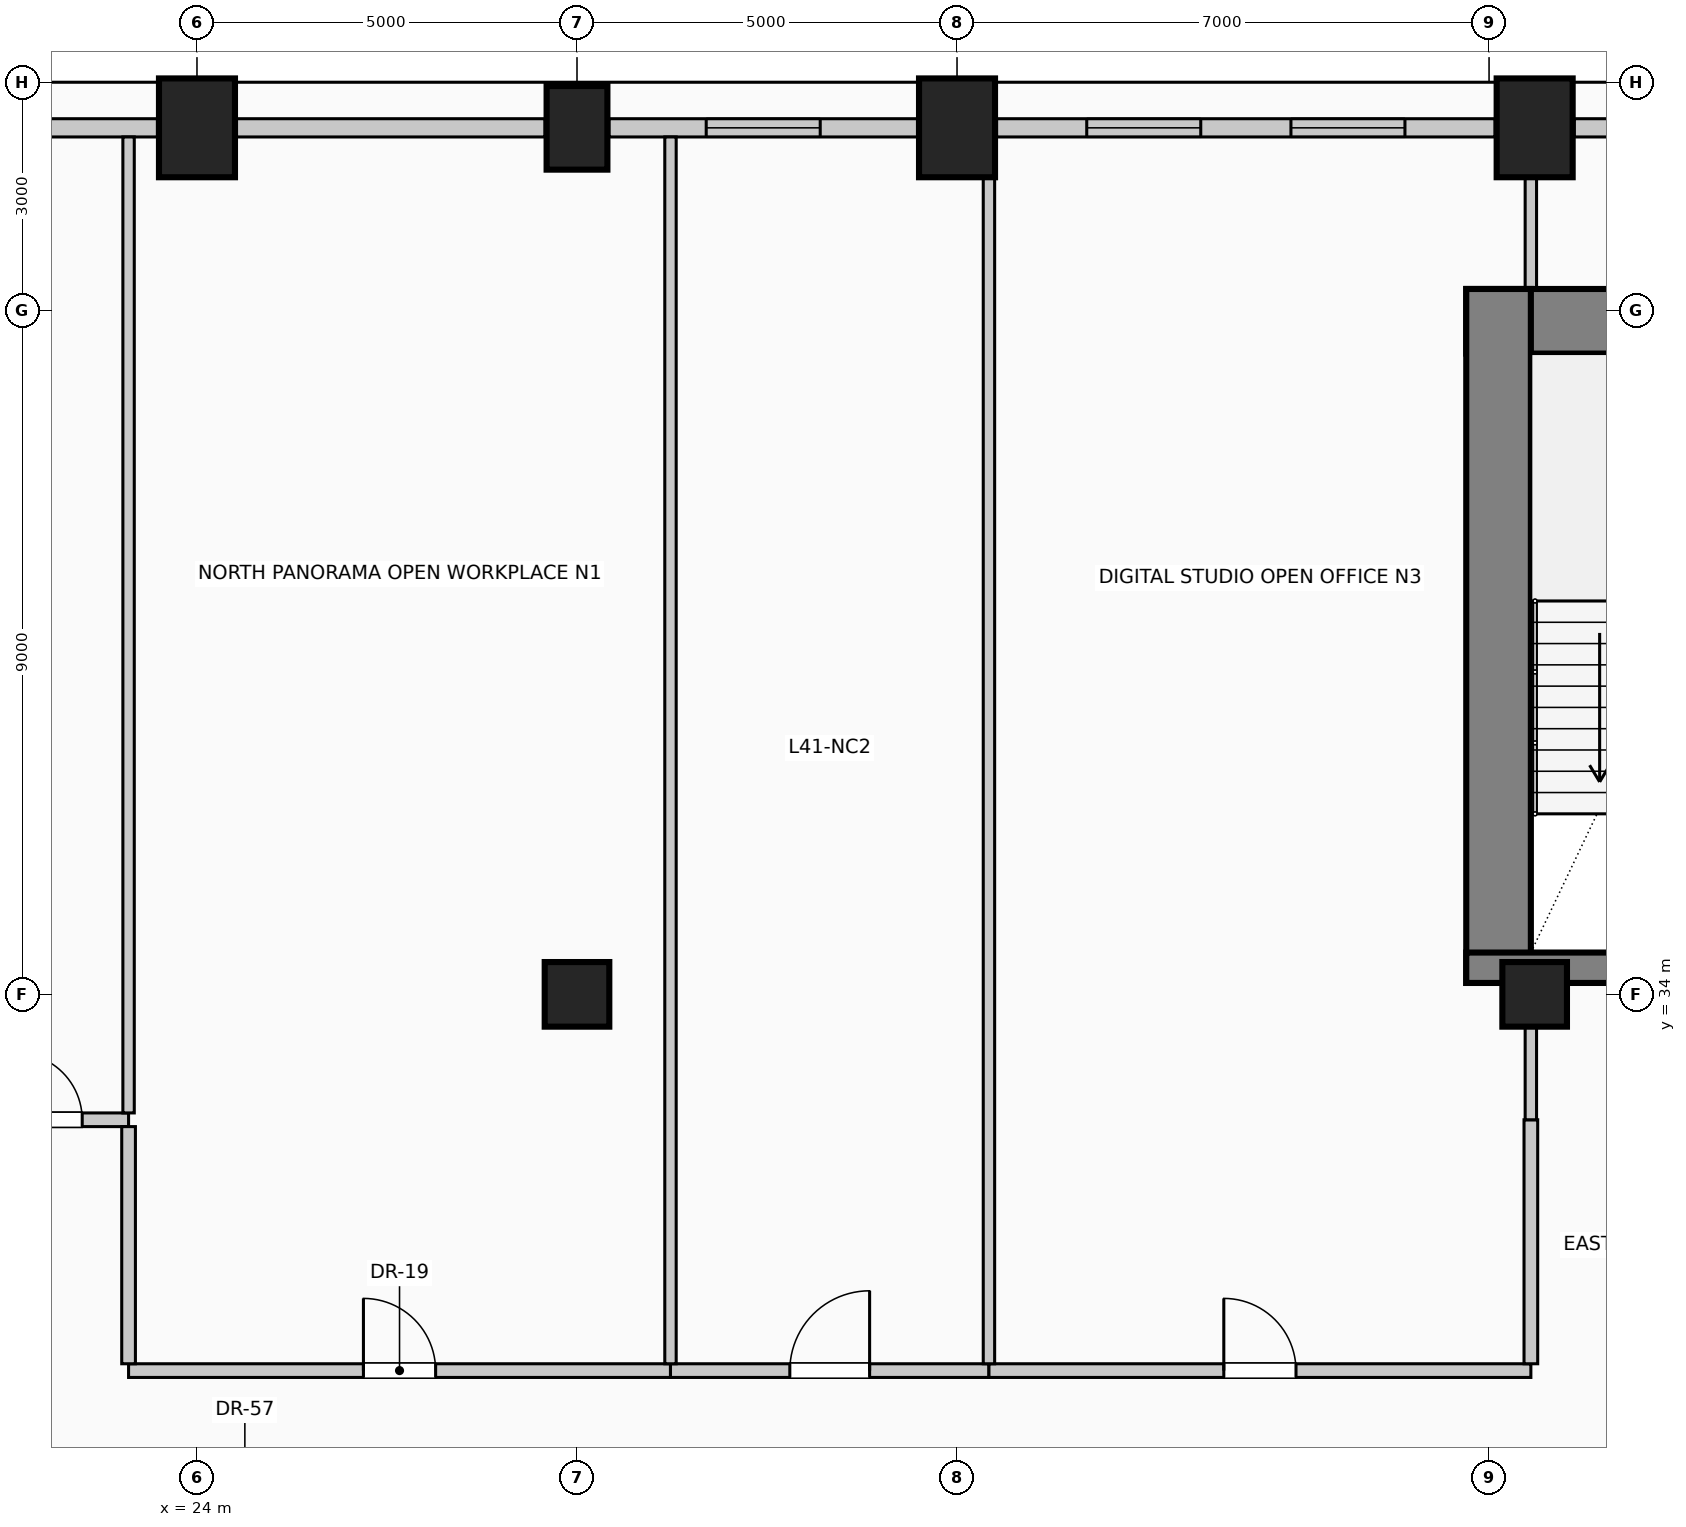
"""IFC4 building model, lengths in metres.
Left out: names, types, materials, properties, quantities, classifications, styles, units other than length and angle.
Written with IfcOpenShell. Run it as: python <this file> out.ifc"""

import sys

from ifc_helpers import new_model, si_unit, direction, frame, frame_2d, origin, origin_2d, place, context, subcontext, project, spatial, rectangle, circle, extrude, element, fill, save


model = new_model("IFC4")
c1 = context("Model", 3, precision=1e-05, world=origin(), true_north=direction((0.0, 1.0)))
c2 = subcontext(c1, "Body", "Model", "MODEL_VIEW")
j1 = project(units=[si_unit("LENGTHUNIT", "METRE"), si_unit("PLANEANGLEUNIT", "RADIAN")], contexts=[c1])
p1 = place(None, origin())
s1 = spatial("IfcSite", under=j1, at=p1, CompositionType="ELEMENT")
p2 = place(p1, origin())
s2 = spatial("IfcBuilding", under=s1, at=p2, CompositionType="ELEMENT")
p3 = place(p2, frame((0.0, 0.0, 170.6)))
s3 = spatial("IfcBuildingStorey", under=s2, at=p3, CompositionType="ELEMENT", Elevation=170.6)
p4 = place(p3, frame((40.7, 42.855, 0.0), z_axis=(0.0, 0.0, 1.0), x_axis=(1.0, 0.0, 0.0)))
e1 = element("IfcWall", 1, at=p4, inside=s3, PredefinedType="SHEAR", context=c2, shape_type="SweptSolid", body=[
    extrude(rectangle(XDim=14.6, YDim=0.85, at=frame_2d((7.3, 0.0))), origin(), (0.0, 0.0, 1.0), 4.0),
])
p5 = place(p3, frame((41.125, 34.15, 0.0), z_axis=(0.0, 0.0, 1.0), x_axis=(0.0, 1.0, 0.0)))
e2 = element("IfcWall", 2, at=p5, inside=s3, PredefinedType="SHEAR", context=c2, shape_type="SweptSolid", body=[
    extrude(rectangle(XDim=9.13, YDim=0.85, at=frame_2d((4.565, 0.0))), origin(), (0.0, 0.0, 1.0), 4.0),
])
p6 = place(p3, frame((40.7, 34.35, 0.0), z_axis=(0.0, 0.0, 1.0), x_axis=(1.0, 0.0, 0.0)))
e3 = element("IfcWall", 3, at=p6, inside=s3, PredefinedType="SHEAR", context=c2, shape_type="SweptSolid", body=[
    extrude(rectangle(XDim=5.01, YDim=0.4, at=frame_2d((2.505, 0.0))), origin(), (0.0, 0.0, 1.0), 4.0),
])
p7 = place(p6, frame((2.4, 0.0, 0.0)))
e4 = element("IfcOpeningElement", 4, at=p7, cuts=e3, PredefinedType="OPENING", context=c2, shape_type="SweptSolid", body=[
    extrude(rectangle(XDim=1.15, YDim=2.2, at=frame_2d((0.575, 1.1))), frame((0.0, 0.21, 0.0), z_axis=(0.0, -1.0, 0.0), x_axis=(1.0, 0.0, 0.0)), (0.0, 0.0, 1.0), 0.42),
])
p8 = place(p3, frame((24.0, 45.4, 0.0), z_axis=(0.0, 0.0, 1.0), x_axis=(1.0, 0.0, 0.0)))
e5 = element("IfcColumn", 5, at=p8, inside=s3, PredefinedType="COLUMN", context=c2, shape_type="SweptSolid", body=[
    extrude(rectangle(XDim=1.0, YDim=1.3, at=origin_2d()), origin(), (0.0, 0.0, 1.0), 4.0),
])
p9 = place(p3, frame((29.0, 45.4, 0.0), z_axis=(0.0, 0.0, 1.0), x_axis=(1.0, 0.0, 0.0)))
e6 = element("IfcColumn", 6, at=p9, inside=s3, PredefinedType="COLUMN", context=c2, shape_type="SweptSolid", body=[
    extrude(rectangle(XDim=0.8, YDim=1.1, at=origin_2d()), origin(), (0.0, 0.0, 1.0), 4.0),
])
for number, where, z_axis, x_axis in (
    (7, (34.0, 45.4, 0.0), (0.0, 0.0, 1.0), (1.0, 0.0, 0.0)),
    (8, (41.6, 45.4, 0.0), (0.0, 0.0, 1.0), (1.0, 0.0, 0.0)),
):
    element("IfcColumn", number, at=place(p3, frame(where, z_axis=z_axis, x_axis=x_axis)), inside=s3, PredefinedType="COLUMN", context=c2, shape_type="SweptSolid", body=[
        extrude(rectangle(XDim=1.0, YDim=1.3, at=origin_2d()), origin(), (0.0, 0.0, 1.0), 4.0),
    ])
for number, where, z_axis, x_axis in (
    (9, (29.0, 34.0, 0.0), (0.0, 0.0, 1.0), (1.0, 0.0, 0.0)),
    (10, (41.6, 34.0, 0.0), (0.0, 0.0, 1.0), (1.0, 0.0, 0.0)),
):
    element("IfcColumn", number, at=place(p3, frame(where, z_axis=z_axis, x_axis=x_axis)), inside=s3, PredefinedType="COLUMN", context=c2, shape_type="SweptSolid", body=[
        extrude(circle(Radius=0.425, at=origin_2d()), origin(), (0.0, 0.0, 1.0), 4.0),
    ])
p10 = place(p3, frame((16.92, 45.4, 0.0), z_axis=(0.0, 0.0, 1.0), x_axis=(1.0, 0.0, 0.0)))
e11 = element("IfcWall", 11, at=p10, inside=s3, PredefinedType="SOLIDWALL", context=c2, shape_type="SweptSolid", body=[
    extrude(rectangle(XDim=6.56, YDim=0.24, at=frame_2d((3.28, 0.0))), origin(), (0.0, 0.0, 1.0), 2.975),
])
p11 = place(p10, frame((1.187, 0.0, 0.42)))
e12 = element("IfcOpeningElement", 12, at=p11, cuts=e11, PredefinedType="OPENING", context=c2, shape_type="SweptSolid", body=[
    extrude(rectangle(XDim=1.5, YDim=2.2, at=frame_2d((0.75, 1.1))), frame((0.0, 0.13, 0.0), z_axis=(0.0, -1.0, 0.0), x_axis=(1.0, 0.0, 0.0)), (0.0, 0.0, 1.0), 0.26),
])
p12 = place(p3, frame((24.52, 45.4, 0.0), z_axis=(0.0, 0.0, 1.0), x_axis=(1.0, 0.0, 0.0)))
e13 = element("IfcWall", 13, at=p12, inside=s3, PredefinedType="SOLIDWALL", context=c2, shape_type="SweptSolid", body=[
    extrude(rectangle(XDim=4.06, YDim=0.24, at=frame_2d((2.03, 0.0))), origin(), (0.0, 0.0, 1.0), 2.975),
])
p13 = place(p3, frame((29.42, 45.4, 0.0), z_axis=(0.0, 0.0, 1.0), x_axis=(1.0, 0.0, 0.0)))
e14 = element("IfcWall", 14, at=p13, inside=s3, PredefinedType="SOLIDWALL", context=c2, shape_type="SweptSolid", body=[
    extrude(rectangle(XDim=4.06, YDim=0.24, at=frame_2d((2.03, 0.0))), origin(), (0.0, 0.0, 1.0), 2.975),
])
p14 = place(p13, frame((1.28, 0.0, 0.42)))
e15 = element("IfcOpeningElement", 15, at=p14, cuts=e14, PredefinedType="OPENING", context=c2, shape_type="SweptSolid", body=[
    extrude(rectangle(XDim=1.5, YDim=2.2, at=frame_2d((0.75, 1.1))), frame((0.0, 0.13, 0.0), z_axis=(0.0, -1.0, 0.0), x_axis=(1.0, 0.0, 0.0)), (0.0, 0.0, 1.0), 0.26),
])
p15 = place(p3, frame((34.52, 45.4, 0.0), z_axis=(0.0, 0.0, 1.0), x_axis=(1.0, 0.0, 0.0)))
e16 = element("IfcWall", 16, at=p15, inside=s3, PredefinedType="SOLIDWALL", context=c2, shape_type="SweptSolid", body=[
    extrude(rectangle(XDim=6.56, YDim=0.24, at=frame_2d((3.28, 0.0))), origin(), (0.0, 0.0, 1.0), 2.975),
])
p16 = place(p15, frame((1.187, 0.0, 0.42)))
e17 = element("IfcOpeningElement", 17, at=p16, cuts=e16, PredefinedType="OPENING", context=c2, shape_type="SweptSolid", body=[
    extrude(rectangle(XDim=1.5, YDim=2.2, at=frame_2d((0.75, 1.1))), frame((0.0, 0.13, 0.0), z_axis=(0.0, -1.0, 0.0), x_axis=(1.0, 0.0, 0.0)), (0.0, 0.0, 1.0), 0.26),
])
p17 = place(p15, frame((3.873, 0.0, 0.42)))
e18 = element("IfcOpeningElement", 18, at=p17, cuts=e16, PredefinedType="OPENING", context=c2, shape_type="SweptSolid", body=[
    extrude(rectangle(XDim=1.5, YDim=2.2, at=frame_2d((0.75, 1.1))), frame((0.0, 0.13, 0.0), z_axis=(0.0, -1.0, 0.0), x_axis=(1.0, 0.0, 0.0)), (0.0, 0.0, 1.0), 0.26),
])
p18 = place(p3, frame((42.12, 45.4, 0.0), z_axis=(0.0, 0.0, 1.0), x_axis=(1.0, 0.0, 0.0)))
e19 = element("IfcWall", 19, at=p18, inside=s3, PredefinedType="SOLIDWALL", context=c2, shape_type="SweptSolid", body=[
    extrude(rectangle(XDim=1.46, YDim=0.24, at=frame_2d((0.73, 0.0))), origin(), (0.0, 0.0, 1.0), 2.975),
])
p19 = place(p3, frame((23.1, 29.05, 0.0), z_axis=(0.0, 0.0, 1.0), x_axis=(1.0, 0.0, 0.0)))
e20 = element("IfcWall", 20, at=p19, inside=s3, PredefinedType="PARTITIONING", context=c2, shape_type="SweptSolid", body=[
    extrude(rectangle(XDim=7.13, YDim=0.18, at=frame_2d((3.565, 0.0))), origin(), (0.0, 0.0, 1.0), 3.725),
])
p20 = place(p19, frame((3.09, 0.0, 0.0)))
e21 = element("IfcOpeningElement", 21, at=p20, cuts=e20, PredefinedType="OPENING", context=c2, shape_type="SweptSolid", body=[
    extrude(rectangle(XDim=0.95, YDim=2.15, at=frame_2d((0.475, 1.075))), frame((0.0, 0.1, 0.0), z_axis=(0.0, -1.0, 0.0), x_axis=(1.0, 0.0, 0.0)), (0.0, 0.0, 1.0), 0.2),
])
p21 = place(p3, frame((30.23, 29.05, 0.0), z_axis=(0.0, 0.0, 1.0), x_axis=(1.0, 0.0, 0.0)))
e22 = element("IfcWall", 22, at=p21, inside=s3, PredefinedType="PARTITIONING", context=c2, shape_type="SweptSolid", body=[
    extrude(rectangle(XDim=4.19, YDim=0.18, at=frame_2d((2.095, 0.0))), origin(), (0.0, 0.0, 1.0), 3.725),
])
p22 = place(p21, frame((1.57, 0.0, 0.0)))
e23 = element("IfcOpeningElement", 23, at=p22, cuts=e22, PredefinedType="OPENING", context=c2, shape_type="SweptSolid", body=[
    extrude(rectangle(XDim=1.05, YDim=2.15, at=frame_2d((0.525, 1.075))), frame((0.0, 0.1, 0.0), z_axis=(0.0, -1.0, 0.0), x_axis=(1.0, 0.0, 0.0)), (0.0, 0.0, 1.0), 0.2),
])
p23 = place(p3, frame((34.42, 29.05, 0.0), z_axis=(0.0, 0.0, 1.0), x_axis=(1.0, 0.0, 0.0)))
e24 = element("IfcWall", 24, at=p23, inside=s3, PredefinedType="PARTITIONING", context=c2, shape_type="SweptSolid", body=[
    extrude(rectangle(XDim=7.13, YDim=0.18, at=frame_2d((3.565, 0.0))), origin(), (0.0, 0.0, 1.0), 3.725),
])
p24 = place(p23, frame((3.09, 0.0, 0.0)))
e25 = element("IfcOpeningElement", 25, at=p24, cuts=e24, PredefinedType="OPENING", context=c2, shape_type="SweptSolid", body=[
    extrude(rectangle(XDim=0.95, YDim=2.15, at=frame_2d((0.475, 1.075))), frame((0.0, 0.1, 0.0), z_axis=(0.0, -1.0, 0.0), x_axis=(1.0, 0.0, 0.0)), (0.0, 0.0, 1.0), 0.2),
])
p25 = place(p3, frame((21.0, 32.35, 0.0), z_axis=(0.0, 0.0, 1.0), x_axis=(1.0, 0.0, 0.0)))
e26 = element("IfcWall", 26, at=p25, inside=s3, PredefinedType="PARTITIONING", context=c2, shape_type="SweptSolid", body=[
    extrude(rectangle(XDim=2.1, YDim=0.18, at=frame_2d((1.05, 0.0))), origin(), (0.0, 0.0, 1.0), 3.725),
])
p26 = place(p25, frame((0.61, 0.0, 0.0)))
e27 = element("IfcOpeningElement", 27, at=p26, cuts=e26, PredefinedType="OPENING", context=c2, shape_type="SweptSolid", body=[
    extrude(rectangle(XDim=0.88, YDim=2.1, at=frame_2d((0.44, 1.05))), frame((0.0, 0.1, 0.0), z_axis=(0.0, -1.0, 0.0), x_axis=(1.0, 0.0, 0.0)), (0.0, 0.0, 1.0), 0.2),
])
p27 = place(p3, frame((23.1, 29.14, 0.0), z_axis=(0.0, 0.0, 1.0), x_axis=(0.0, 1.0, 0.0)))
e28 = element("IfcWall", 28, at=p27, inside=s3, PredefinedType="PARTITIONING", context=c2, shape_type="SweptSolid", body=[
    extrude(rectangle(XDim=3.12, YDim=0.18, at=frame_2d((1.56, 0.0))), origin(), (0.0, 0.0, 1.0), 3.725),
])
p28 = place(p3, frame((23.1, 32.44, 0.0), z_axis=(0.0, 0.0, 1.0), x_axis=(0.0, 1.0, 0.0)))
e29 = element("IfcWall", 29, at=p28, inside=s3, PredefinedType="PARTITIONING", context=c2, shape_type="SweptSolid", body=[
    extrude(rectangle(XDim=12.84, YDim=0.15, at=frame_2d((6.42, 0.0))), origin(), (0.0, 0.0, 1.0), 3.725),
])
p29 = place(p3, frame((30.23, 29.14, 0.0), z_axis=(0.0, 0.0, 1.0), x_axis=(0.0, 1.0, 0.0)))
e30 = element("IfcWall", 30, at=p29, inside=s3, PredefinedType="PARTITIONING", context=c2, shape_type="SweptSolid", body=[
    extrude(rectangle(XDim=16.14, YDim=0.15, at=frame_2d((8.07, 0.0))), origin(), (0.0, 0.0, 1.0), 3.725),
])
p30 = place(p3, frame((34.42, 29.14, 0.0), z_axis=(0.0, 0.0, 1.0), x_axis=(0.0, 1.0, 0.0)))
e31 = element("IfcWall", 31, at=p30, inside=s3, PredefinedType="PARTITIONING", context=c2, shape_type="SweptSolid", body=[
    extrude(rectangle(XDim=15.61, YDim=0.15, at=frame_2d((7.805, 0.0))), origin(), (0.0, 0.0, 1.0), 3.725),
])
p31 = place(p3, frame((41.55, 29.14, 0.0), z_axis=(0.0, 0.0, 1.0), x_axis=(0.0, 1.0, 0.0)))
e32 = element("IfcWall", 32, at=p31, inside=s3, PredefinedType="PARTITIONING", context=c2, shape_type="SweptSolid", body=[
    extrude(rectangle(XDim=3.21, YDim=0.18, at=frame_2d((1.605, 0.0))), origin(), (0.0, 0.0, 1.0), 3.12),
])
p32 = place(p3, frame((41.55, 32.35, 0.0), z_axis=(0.0, 0.0, 1.0), x_axis=(0.0, 1.0, 0.0)))
e33 = element("IfcWall", 33, at=p32, inside=s3, PredefinedType="PARTITIONING", context=c2, shape_type="SweptSolid", body=[
    extrude(rectangle(XDim=1.225, YDim=0.15, at=frame_2d((0.612, 0.0))), origin(), (0.0, 0.0, 1.0), 3.12),
])
p33 = place(p3, frame((41.55, 43.28, 0.0), z_axis=(0.0, 0.0, 1.0), x_axis=(0.0, 1.0, 0.0)))
e34 = element("IfcWall", 34, at=p33, inside=s3, PredefinedType="PARTITIONING", context=c2, shape_type="SweptSolid", body=[
    extrude(rectangle(XDim=1.47, YDim=0.15, at=frame_2d((0.735, 0.0))), origin(), (0.0, 0.0, 1.0), 3.725),
])
p34 = place(p14, origin())
e35 = element("IfcWindow", 35, at=p34, inside=s3, PartitioningType="SINGLE_PANEL", PredefinedType="WINDOW", context=c2, shape_type="SweptSolid", body=[
    extrude(rectangle(XDim=1.5, YDim=2.2, at=frame_2d((0.75, 1.1))), frame((0.0, 0.03, 0.0), z_axis=(0.0, -1.0, 0.0), x_axis=(1.0, 0.0, 0.0)), (0.0, 0.0, 1.0), 0.06),
])
fill(e15, e35)
p35 = place(p16, origin())
e36 = element("IfcWindow", 36, at=p35, inside=s3, PartitioningType="SINGLE_PANEL", PredefinedType="WINDOW", context=c2, shape_type="SweptSolid", body=[
    extrude(rectangle(XDim=1.5, YDim=2.2, at=frame_2d((0.75, 1.1))), frame((0.0, 0.03, 0.0), z_axis=(0.0, -1.0, 0.0), x_axis=(1.0, 0.0, 0.0)), (0.0, 0.0, 1.0), 0.06),
])
fill(e17, e36)
p36 = place(p17, origin())
e37 = element("IfcWindow", 37, at=p36, inside=s3, PartitioningType="SINGLE_PANEL", PredefinedType="WINDOW", context=c2, shape_type="SweptSolid", body=[
    extrude(rectangle(XDim=1.5, YDim=2.2, at=frame_2d((0.75, 1.1))), frame((0.0, 0.03, 0.0), z_axis=(0.0, -1.0, 0.0), x_axis=(1.0, 0.0, 0.0)), (0.0, 0.0, 1.0), 0.06),
])
fill(e18, e37)
p37 = place(p20, origin())
e38 = element("IfcDoor", 38, at=p37, inside=s3, OperationType="SINGLE_SWING_LEFT", PredefinedType="DOOR", context=c2, shape_type="SweptSolid", body=[
    extrude(rectangle(XDim=0.95, YDim=2.15, at=frame_2d((0.475, 1.075))), frame((0.0, 0.025, 0.0), z_axis=(0.0, -1.0, 0.0), x_axis=(1.0, 0.0, 0.0)), (0.0, 0.0, 1.0), 0.05),
])
fill(e21, e38)
p38 = place(p22, origin())
e39 = element("IfcDoor", 39, at=p38, inside=s3, OperationType="SINGLE_SWING_RIGHT", PredefinedType="DOOR", context=c2, shape_type="SweptSolid", body=[
    extrude(rectangle(XDim=1.05, YDim=2.15, at=frame_2d((0.525, 1.075))), frame((0.0, 0.025, 0.0), z_axis=(0.0, -1.0, 0.0), x_axis=(1.0, 0.0, 0.0)), (0.0, 0.0, 1.0), 0.05),
])
fill(e23, e39)
p39 = place(p24, origin())
e40 = element("IfcDoor", 40, at=p39, inside=s3, OperationType="SINGLE_SWING_LEFT", PredefinedType="DOOR", context=c2, shape_type="SweptSolid", body=[
    extrude(rectangle(XDim=0.95, YDim=2.15, at=frame_2d((0.475, 1.075))), frame((0.0, 0.025, 0.0), z_axis=(0.0, -1.0, 0.0), x_axis=(1.0, 0.0, 0.0)), (0.0, 0.0, 1.0), 0.05),
])
fill(e25, e40)
p40 = place(p26, origin())
e41 = element("IfcDoor", 41, at=p40, inside=s3, OperationType="SINGLE_SWING_LEFT", PredefinedType="DOOR", context=c2, shape_type="SweptSolid", body=[
    extrude(rectangle(XDim=0.88, YDim=2.1, at=frame_2d((0.44, 1.05))), frame((0.0, 0.025, 0.0), z_axis=(0.0, -1.0, 0.0), x_axis=(1.0, 0.0, 0.0)), (0.0, 0.0, 1.0), 0.05),
])
fill(e27, e41)
save(model, sys.argv[1])
